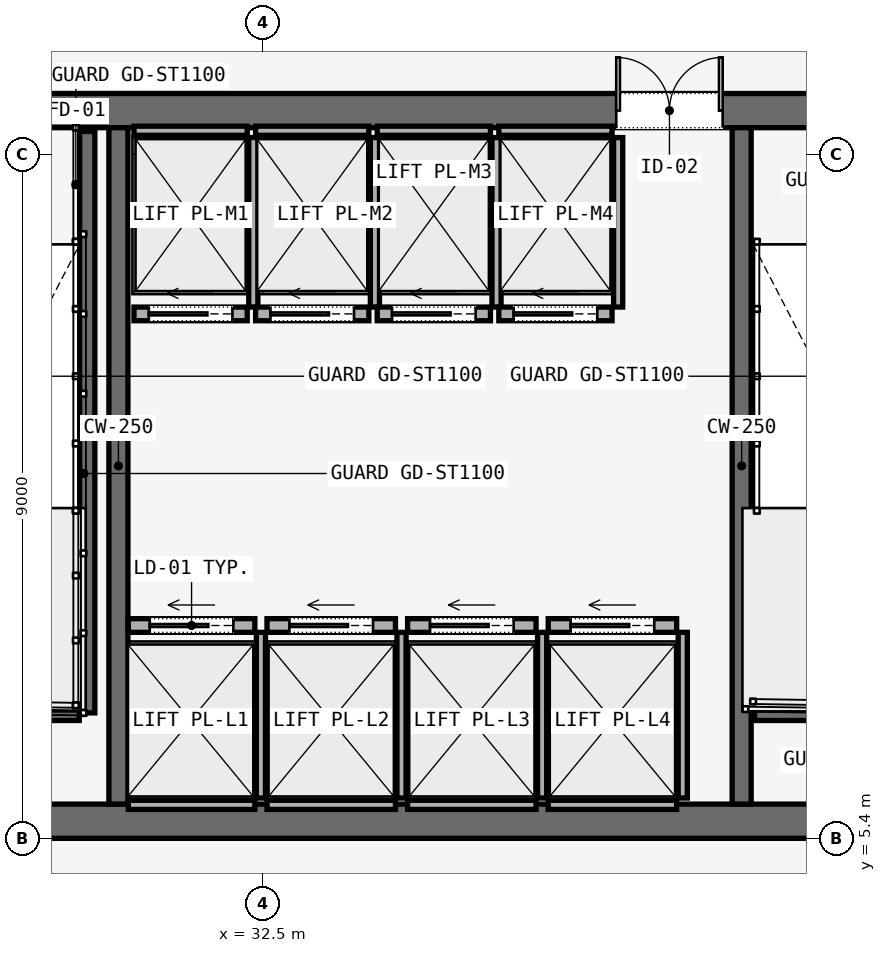
"""IFC4 building model, lengths in metres.
Left out: names, types, materials, properties, quantities, classifications, styles, units other than length and angle.
Written with IfcOpenShell. Run it as: python <this file> out.ifc"""

import sys

from ifc_helpers import new_model, si_unit, direction, frame, frame_2d, origin, place, context, subcontext, project, spatial, rectangle, extrude, element, fill, save


model = new_model("IFC4")
c1 = context("Model", 3, precision=1e-05, world=origin(), true_north=direction((0.0, 1.0)))
c2 = subcontext(c1, "Body", "Model", "MODEL_VIEW")
j1 = project(units=[si_unit("LENGTHUNIT", "METRE"), si_unit("PLANEANGLEUNIT", "RADIAN")], contexts=[c1])
p1 = place(None, origin())
s1 = spatial("IfcSite", under=j1, at=p1, CompositionType="ELEMENT")
p2 = place(p1, origin())
s2 = spatial("IfcBuilding", under=s1, at=p2, CompositionType="ELEMENT")
p3 = place(p2, frame((0.0, 0.0, 117.4)))
s3 = spatial("IfcBuildingStorey", under=s2, at=p3, CompositionType="ELEMENT", Elevation=117.4)
p4 = place(p3, frame((26.45, 14.975, 0.0), z_axis=(0.0, 0.0, 1.0), x_axis=(1.0, 0.0, 0.0)))
e1 = element("IfcWall", 1, at=p4, inside=s3, PredefinedType="SOLIDWALL", context=c2, shape_type="SweptSolid", body=[
    extrude(rectangle(XDim=31.1, YDim=0.45, at=frame_2d((15.55, 0.0))), origin(), (0.0, 0.0, 1.0), 4.52),
])
p5 = place(p4, frame((1.65, 0.0, 0.0)))
e2 = element("IfcOpeningElement", 2, at=p5, cuts=e1, PredefinedType="OPENING", context=c2, shape_type="SweptSolid", body=[
    extrude(rectangle(XDim=1.1, YDim=2.2, at=frame_2d((0.55, 1.1))), frame((0.0, 0.225, 0.0), z_axis=(0.0, -1.0, 0.0), x_axis=(1.0, 0.0, 0.0)), (0.0, 0.0, 1.0), 0.45),
])
p6 = place(p4, frame((13.65, 0.0, 0.0)))
e3 = element("IfcOpeningElement", 3, at=p6, cuts=e1, PredefinedType="OPENING", context=c2, shape_type="SweptSolid", body=[
    extrude(rectangle(XDim=1.1, YDim=2.2, at=frame_2d((0.55, 1.1))), frame((0.0, 0.225, 0.0), z_axis=(0.0, -1.0, 0.0), x_axis=(1.0, 0.0, 0.0)), (0.0, 0.0, 1.0), 0.45),
])
p7 = place(p4, frame((25.55, 0.0, 0.0)))
e4 = element("IfcOpeningElement", 4, at=p7, cuts=e1, PredefinedType="OPENING", context=c2, shape_type="SweptSolid", body=[
    extrude(rectangle(XDim=1.1, YDim=2.2, at=frame_2d((0.55, 1.1))), frame((0.0, 0.225, 0.0), z_axis=(0.0, -1.0, 0.0), x_axis=(1.0, 0.0, 0.0)), (0.0, 0.0, 1.0), 0.45),
])
p8 = place(p4, frame((10.7, 0.0, 0.0)))
e5 = element("IfcOpeningElement", 5, at=p8, cuts=e1, PredefinedType="OPENING", context=c2, shape_type="SweptSolid", body=[
    extrude(rectangle(XDim=1.4, YDim=2.2, at=frame_2d((0.7, 1.1))), frame((0.0, 0.225, 0.0), z_axis=(0.0, -1.0, 0.0), x_axis=(1.0, 0.0, 0.0)), (0.0, 0.0, 1.0), 0.45),
])
p9 = place(p4, frame((19.35, 0.0, 0.0)))
e6 = element("IfcOpeningElement", 6, at=p9, cuts=e1, PredefinedType="OPENING", context=c2, shape_type="SweptSolid", body=[
    extrude(rectangle(XDim=1.1, YDim=2.2, at=frame_2d((0.55, 1.1))), frame((0.0, 0.225, 0.0), z_axis=(0.0, -1.0, 0.0), x_axis=(1.0, 0.0, 0.0)), (0.0, 0.0, 1.0), 0.45),
])
p10 = place(p4, frame((21.4, 0.0, 0.0)))
e7 = element("IfcOpeningElement", 7, at=p10, cuts=e1, PredefinedType="OPENING", context=c2, shape_type="SweptSolid", body=[
    extrude(rectangle(XDim=0.9, YDim=2.1, at=frame_2d((0.45, 1.05))), frame((0.0, 0.225, 0.0), z_axis=(0.0, -1.0, 0.0), x_axis=(1.0, 0.0, 0.0)), (0.0, 0.0, 1.0), 0.45),
])
p11 = place(p4, frame((23.35, 0.0, 0.0)))
e8 = element("IfcOpeningElement", 8, at=p11, cuts=e1, PredefinedType="OPENING", context=c2, shape_type="SweptSolid", body=[
    extrude(rectangle(XDim=1.3, YDim=2.3, at=frame_2d((0.65, 1.15))), frame((0.0, 0.225, 0.0), z_axis=(0.0, -1.0, 0.0), x_axis=(1.0, 0.0, 0.0)), (0.0, 0.0, 1.0), 0.45),
])
p12 = place(p3, frame((26.45, 5.625, 0.0), z_axis=(0.0, 0.0, 1.0), x_axis=(1.0, 0.0, 0.0)))
e9 = element("IfcWall", 9, at=p12, inside=s3, PredefinedType="SOLIDWALL", context=c2, shape_type="SweptSolid", body=[
    extrude(rectangle(XDim=31.1, YDim=0.45, at=frame_2d((15.55, 0.0))), origin(), (0.0, 0.0, 1.0), 4.52),
])
for number, where, z_axis, x_axis in (
    (10, (30.6, 5.85, 0.0), (0.0, 0.0, 1.0), (0.0, 1.0, 0.0)),
    (11, (38.8, 5.85, 0.0), (0.0, 0.0, 1.0), (0.0, 1.0, 0.0)),
):
    element("IfcWall", number, at=place(p3, frame(where, z_axis=z_axis, x_axis=x_axis)), inside=s3, PredefinedType="SOLIDWALL", context=c2, shape_type="SweptSolid", body=[
        extrude(rectangle(XDim=8.9, YDim=0.25, at=frame_2d((4.45, 0.0))), origin(), (0.0, 0.0, 1.0), 4.52),
    ])
p13 = place(p3, frame((30.19, 14.7, 0.0), z_axis=(0.0, 0.0, 1.0), x_axis=(0.0, -1.0, 0.0)))
e12 = element("IfcWall", 12, at=p13, inside=s3, PredefinedType="SOLIDWALL", context=c2, shape_type="SweptSolid", body=[
    extrude(rectangle(XDim=7.65, YDim=0.2, at=frame_2d((3.825, 0.0))), origin(), (0.0, 0.0, 1.0), 4.8),
])
for number, where, z_axis, x_axis in (
    (13, (26.97, 7.05, 0.0), (0.0, 0.0, 1.0), (1.0, 0.0, 0.0)),
    (14, (38.97, 7.05, 0.0), (0.0, 0.0, 1.0), (1.0, 0.0, 0.0)),
):
    element("IfcWall", number, at=place(p3, frame(where, z_axis=z_axis, x_axis=x_axis)), inside=s3, PredefinedType="SOLIDWALL", context=c2, shape_type="SweptSolid", body=[
        extrude(rectangle(XDim=3.115, YDim=0.2, at=frame_2d((1.558, 0.0))), origin(), (0.0, 0.0, 1.0), 4.8),
    ])
p14 = place(p3, frame((30.73, 8.2, 0.0), z_axis=(0.0, 0.0, 1.0), x_axis=(1.0, 0.0, 0.0)))
e15 = element("IfcWall", 15, at=p14, inside=s3, PredefinedType="SOLIDWALL", context=c2, shape_type="SweptSolid", body=[
    extrude(rectangle(XDim=1.665, YDim=0.18, at=frame_2d((0.833, 0.0))), origin(), (0.0, 0.0, 1.0), 3.39),
])
p15 = place(p14, frame((0.282, 0.0, 0.0)))
e16 = element("IfcOpeningElement", 16, at=p15, cuts=e15, PredefinedType="OPENING", context=c2, shape_type="SweptSolid", body=[
    extrude(rectangle(XDim=1.1, YDim=2.2, at=frame_2d((0.55, 1.1))), frame((0.0, 0.09, 0.0), z_axis=(0.0, -1.0, 0.0), x_axis=(1.0, 0.0, 0.0)), (0.0, 0.0, 1.0), 0.18),
])
p16 = place(p3, frame((30.73, 5.84, 0.0), z_axis=(0.0, 0.0, 1.0), x_axis=(1.0, 0.0, 0.0)))
e17 = element("IfcWall", 17, at=p16, inside=s3, PredefinedType="SOLIDWALL", context=c2, shape_type="SweptSolid", body=[
    extrude(rectangle(XDim=1.665, YDim=0.12, at=frame_2d((0.833, 0.0))), origin(), (0.0, 0.0, 1.0), 3.39),
])
p17 = place(p3, frame((32.475, 5.93, 0.0), z_axis=(0.0, 0.0, 1.0), x_axis=(0.0, 1.0, 0.0)))
e18 = element("IfcWall", 18, at=p17, inside=s3, PredefinedType="SOLIDWALL", context=c2, shape_type="SweptSolid", body=[
    extrude(rectangle(XDim=2.18, YDim=0.12, at=frame_2d((1.09, 0.0))), origin(), (0.0, 0.0, 1.0), 3.39),
])
p18 = place(p3, frame((32.555, 8.2, 0.0), z_axis=(0.0, 0.0, 1.0), x_axis=(1.0, 0.0, 0.0)))
e19 = element("IfcWall", 19, at=p18, inside=s3, PredefinedType="SOLIDWALL", context=c2, shape_type="SweptSolid", body=[
    extrude(rectangle(XDim=1.69, YDim=0.18, at=frame_2d((0.845, 0.0))), origin(), (0.0, 0.0, 1.0), 3.39),
])
p19 = place(p18, frame((0.295, 0.0, 0.0)))
e20 = element("IfcOpeningElement", 20, at=p19, cuts=e19, PredefinedType="OPENING", context=c2, shape_type="SweptSolid", body=[
    extrude(rectangle(XDim=1.1, YDim=2.2, at=frame_2d((0.55, 1.1))), frame((0.0, 0.09, 0.0), z_axis=(0.0, -1.0, 0.0), x_axis=(1.0, 0.0, 0.0)), (0.0, 0.0, 1.0), 0.18),
])
p20 = place(p3, frame((32.555, 5.84, 0.0), z_axis=(0.0, 0.0, 1.0), x_axis=(1.0, 0.0, 0.0)))
e21 = element("IfcWall", 21, at=p20, inside=s3, PredefinedType="SOLIDWALL", context=c2, shape_type="SweptSolid", body=[
    extrude(rectangle(XDim=1.69, YDim=0.12, at=frame_2d((0.845, 0.0))), origin(), (0.0, 0.0, 1.0), 3.39),
])
p21 = place(p3, frame((34.325, 5.93, 0.0), z_axis=(0.0, 0.0, 1.0), x_axis=(0.0, 1.0, 0.0)))
e22 = element("IfcWall", 22, at=p21, inside=s3, PredefinedType="SOLIDWALL", context=c2, shape_type="SweptSolid", body=[
    extrude(rectangle(XDim=2.18, YDim=0.12, at=frame_2d((1.09, 0.0))), origin(), (0.0, 0.0, 1.0), 3.39),
])
p22 = place(p3, frame((34.405, 8.2, 0.0), z_axis=(0.0, 0.0, 1.0), x_axis=(1.0, 0.0, 0.0)))
e23 = element("IfcWall", 23, at=p22, inside=s3, PredefinedType="SOLIDWALL", context=c2, shape_type="SweptSolid", body=[
    extrude(rectangle(XDim=1.69, YDim=0.18, at=frame_2d((0.845, 0.0))), origin(), (0.0, 0.0, 1.0), 3.39),
])
p23 = place(p22, frame((0.295, 0.0, 0.0)))
e24 = element("IfcOpeningElement", 24, at=p23, cuts=e23, PredefinedType="OPENING", context=c2, shape_type="SweptSolid", body=[
    extrude(rectangle(XDim=1.1, YDim=2.2, at=frame_2d((0.55, 1.1))), frame((0.0, 0.09, 0.0), z_axis=(0.0, -1.0, 0.0), x_axis=(1.0, 0.0, 0.0)), (0.0, 0.0, 1.0), 0.18),
])
p24 = place(p3, frame((34.405, 5.84, 0.0), z_axis=(0.0, 0.0, 1.0), x_axis=(1.0, 0.0, 0.0)))
e25 = element("IfcWall", 25, at=p24, inside=s3, PredefinedType="SOLIDWALL", context=c2, shape_type="SweptSolid", body=[
    extrude(rectangle(XDim=1.69, YDim=0.12, at=frame_2d((0.845, 0.0))), origin(), (0.0, 0.0, 1.0), 3.39),
])
p25 = place(p3, frame((36.175, 5.93, 0.0), z_axis=(0.0, 0.0, 1.0), x_axis=(0.0, 1.0, 0.0)))
e26 = element("IfcWall", 26, at=p25, inside=s3, PredefinedType="SOLIDWALL", context=c2, shape_type="SweptSolid", body=[
    extrude(rectangle(XDim=2.18, YDim=0.12, at=frame_2d((1.09, 0.0))), origin(), (0.0, 0.0, 1.0), 3.39),
])
p26 = place(p3, frame((36.255, 8.2, 0.0), z_axis=(0.0, 0.0, 1.0), x_axis=(1.0, 0.0, 0.0)))
e27 = element("IfcWall", 27, at=p26, inside=s3, PredefinedType="SOLIDWALL", context=c2, shape_type="SweptSolid", body=[
    extrude(rectangle(XDim=1.69, YDim=0.18, at=frame_2d((0.845, 0.0))), origin(), (0.0, 0.0, 1.0), 3.39),
])
p27 = place(p26, frame((0.295, 0.0, 0.0)))
e28 = element("IfcOpeningElement", 28, at=p27, cuts=e27, PredefinedType="OPENING", context=c2, shape_type="SweptSolid", body=[
    extrude(rectangle(XDim=1.1, YDim=2.2, at=frame_2d((0.55, 1.1))), frame((0.0, 0.09, 0.0), z_axis=(0.0, -1.0, 0.0), x_axis=(1.0, 0.0, 0.0)), (0.0, 0.0, 1.0), 0.18),
])
p28 = place(p3, frame((36.255, 5.84, 0.0), z_axis=(0.0, 0.0, 1.0), x_axis=(1.0, 0.0, 0.0)))
e29 = element("IfcWall", 29, at=p28, inside=s3, PredefinedType="SOLIDWALL", context=c2, shape_type="SweptSolid", body=[
    extrude(rectangle(XDim=1.69, YDim=0.12, at=frame_2d((0.845, 0.0))), origin(), (0.0, 0.0, 1.0), 3.39),
])
p29 = place(p3, frame((38.025, 5.93, 0.0), z_axis=(0.0, 0.0, 1.0), x_axis=(0.0, 1.0, 0.0)))
e30 = element("IfcWall", 30, at=p29, inside=s3, PredefinedType="SOLIDWALL", context=c2, shape_type="SweptSolid", body=[
    extrude(rectangle(XDim=2.18, YDim=0.12, at=frame_2d((1.09, 0.0))), origin(), (0.0, 0.0, 1.0), 3.39),
])
p30 = place(p3, frame((30.805, 12.3, 0.0), z_axis=(0.0, 0.0, 1.0), x_axis=(1.0, 0.0, 0.0)))
e31 = element("IfcWall", 31, at=p30, inside=s3, PredefinedType="SOLIDWALL", context=c2, shape_type="SweptSolid", body=[
    extrude(rectangle(XDim=1.49, YDim=0.18, at=frame_2d((0.745, 0.0))), origin(), (0.0, 0.0, 1.0), 3.39),
])
p31 = place(p30, frame((0.195, 0.0, 0.0)))
e32 = element("IfcOpeningElement", 32, at=p31, cuts=e31, PredefinedType="OPENING", context=c2, shape_type="SweptSolid", body=[
    extrude(rectangle(XDim=1.1, YDim=2.2, at=frame_2d((0.55, 1.1))), frame((0.0, 0.09, 0.0), z_axis=(0.0, -1.0, 0.0), x_axis=(1.0, 0.0, 0.0)), (0.0, 0.0, 1.0), 0.18),
])
p32 = place(p3, frame((30.805, 14.71, 0.0), z_axis=(0.0, 0.0, 1.0), x_axis=(1.0, 0.0, 0.0)))
e33 = element("IfcWall", 33, at=p32, inside=s3, PredefinedType="SOLIDWALL", context=c2, shape_type="SweptSolid", body=[
    extrude(rectangle(XDim=1.49, YDim=0.12, at=frame_2d((0.745, 0.0))), origin(), (0.0, 0.0, 1.0), 3.39),
])
p33 = place(p3, frame((32.375, 12.39, 0.0), z_axis=(0.0, 0.0, 1.0), x_axis=(0.0, 1.0, 0.0)))
e34 = element("IfcWall", 34, at=p33, inside=s3, PredefinedType="SOLIDWALL", context=c2, shape_type="SweptSolid", body=[
    extrude(rectangle(XDim=2.23, YDim=0.12, at=frame_2d((1.115, 0.0))), origin(), (0.0, 0.0, 1.0), 3.39),
])
p34 = place(p3, frame((32.405, 12.3, 0.0), z_axis=(0.0, 0.0, 1.0), x_axis=(1.0, 0.0, 0.0)))
e35 = element("IfcWall", 35, at=p34, inside=s3, PredefinedType="SOLIDWALL", context=c2, shape_type="SweptSolid", body=[
    extrude(rectangle(XDim=1.49, YDim=0.18, at=frame_2d((0.745, 0.0))), origin(), (0.0, 0.0, 1.0), 3.39),
])
p35 = place(p34, frame((0.195, 0.0, 0.0)))
e36 = element("IfcOpeningElement", 36, at=p35, cuts=e35, PredefinedType="OPENING", context=c2, shape_type="SweptSolid", body=[
    extrude(rectangle(XDim=1.1, YDim=2.2, at=frame_2d((0.55, 1.1))), frame((0.0, 0.09, 0.0), z_axis=(0.0, -1.0, 0.0), x_axis=(1.0, 0.0, 0.0)), (0.0, 0.0, 1.0), 0.18),
])
p36 = place(p3, frame((32.405, 14.71, 0.0), z_axis=(0.0, 0.0, 1.0), x_axis=(1.0, 0.0, 0.0)))
e37 = element("IfcWall", 37, at=p36, inside=s3, PredefinedType="SOLIDWALL", context=c2, shape_type="SweptSolid", body=[
    extrude(rectangle(XDim=1.49, YDim=0.12, at=frame_2d((0.745, 0.0))), origin(), (0.0, 0.0, 1.0), 3.39),
])
p37 = place(p3, frame((33.975, 12.39, 0.0), z_axis=(0.0, 0.0, 1.0), x_axis=(0.0, 1.0, 0.0)))
e38 = element("IfcWall", 38, at=p37, inside=s3, PredefinedType="SOLIDWALL", context=c2, shape_type="SweptSolid", body=[
    extrude(rectangle(XDim=2.23, YDim=0.12, at=frame_2d((1.115, 0.0))), origin(), (0.0, 0.0, 1.0), 3.39),
])
p38 = place(p3, frame((34.005, 12.3, 0.0), z_axis=(0.0, 0.0, 1.0), x_axis=(1.0, 0.0, 0.0)))
e39 = element("IfcWall", 39, at=p38, inside=s3, PredefinedType="SOLIDWALL", context=c2, shape_type="SweptSolid", body=[
    extrude(rectangle(XDim=1.49, YDim=0.18, at=frame_2d((0.745, 0.0))), origin(), (0.0, 0.0, 1.0), 3.39),
])
p39 = place(p38, frame((0.195, 0.0, 0.0)))
e40 = element("IfcOpeningElement", 40, at=p39, cuts=e39, PredefinedType="OPENING", context=c2, shape_type="SweptSolid", body=[
    extrude(rectangle(XDim=1.1, YDim=2.2, at=frame_2d((0.55, 1.1))), frame((0.0, 0.09, 0.0), z_axis=(0.0, -1.0, 0.0), x_axis=(1.0, 0.0, 0.0)), (0.0, 0.0, 1.0), 0.18),
])
p40 = place(p3, frame((34.005, 14.71, 0.0), z_axis=(0.0, 0.0, 1.0), x_axis=(1.0, 0.0, 0.0)))
e41 = element("IfcWall", 41, at=p40, inside=s3, PredefinedType="SOLIDWALL", context=c2, shape_type="SweptSolid", body=[
    extrude(rectangle(XDim=1.49, YDim=0.12, at=frame_2d((0.745, 0.0))), origin(), (0.0, 0.0, 1.0), 3.39),
])
p41 = place(p3, frame((35.575, 12.39, 0.0), z_axis=(0.0, 0.0, 1.0), x_axis=(0.0, 1.0, 0.0)))
e42 = element("IfcWall", 42, at=p41, inside=s3, PredefinedType="SOLIDWALL", context=c2, shape_type="SweptSolid", body=[
    extrude(rectangle(XDim=2.23, YDim=0.12, at=frame_2d((1.115, 0.0))), origin(), (0.0, 0.0, 1.0), 3.39),
])
p42 = place(p3, frame((35.605, 12.3, 0.0), z_axis=(0.0, 0.0, 1.0), x_axis=(1.0, 0.0, 0.0)))
e43 = element("IfcWall", 43, at=p42, inside=s3, PredefinedType="SOLIDWALL", context=c2, shape_type="SweptSolid", body=[
    extrude(rectangle(XDim=1.49, YDim=0.18, at=frame_2d((0.745, 0.0))), origin(), (0.0, 0.0, 1.0), 3.39),
])
p43 = place(p42, frame((0.195, 0.0, 0.0)))
e44 = element("IfcOpeningElement", 44, at=p43, cuts=e43, PredefinedType="OPENING", context=c2, shape_type="SweptSolid", body=[
    extrude(rectangle(XDim=1.1, YDim=2.2, at=frame_2d((0.55, 1.1))), frame((0.0, 0.09, 0.0), z_axis=(0.0, -1.0, 0.0), x_axis=(1.0, 0.0, 0.0)), (0.0, 0.0, 1.0), 0.18),
])
p44 = place(p3, frame((35.605, 14.71, 0.0), z_axis=(0.0, 0.0, 1.0), x_axis=(1.0, 0.0, 0.0)))
e45 = element("IfcWall", 45, at=p44, inside=s3, PredefinedType="SOLIDWALL", context=c2, shape_type="SweptSolid", body=[
    extrude(rectangle(XDim=1.49, YDim=0.12, at=frame_2d((0.745, 0.0))), origin(), (0.0, 0.0, 1.0), 3.39),
])
p45 = place(p3, frame((37.175, 12.39, 0.0), z_axis=(0.0, 0.0, 1.0), x_axis=(0.0, 1.0, 0.0)))
e46 = element("IfcWall", 46, at=p45, inside=s3, PredefinedType="SOLIDWALL", context=c2, shape_type="SweptSolid", body=[
    extrude(rectangle(XDim=2.23, YDim=0.12, at=frame_2d((1.115, 0.0))), origin(), (0.0, 0.0, 1.0), 3.39),
])
p46 = place(p8, origin())
e47 = element("IfcDoor", 47, at=p46, inside=s3, OperationType="DOUBLE_DOOR_SINGLE_SWING", PredefinedType="DOOR", context=c2, shape_type="SweptSolid", body=[
    extrude(rectangle(XDim=1.4, YDim=2.2, at=frame_2d((0.7, 1.1))), frame((0.0, 0.025, 0.0), z_axis=(0.0, -1.0, 0.0), x_axis=(1.0, 0.0, 0.0)), (0.0, 0.0, 1.0), 0.05),
])
fill(e5, e47)
p47 = place(p15, origin())
e48 = element("IfcDoor", 48, at=p47, inside=s3, OperationType="SLIDING_TO_LEFT", PredefinedType="DOOR", context=c2, shape_type="SweptSolid", body=[
    extrude(rectangle(XDim=1.1, YDim=2.2, at=frame_2d((0.55, 1.1))), frame((0.0, 0.025, 0.0), z_axis=(0.0, -1.0, 0.0), x_axis=(1.0, 0.0, 0.0)), (0.0, 0.0, 1.0), 0.05),
])
fill(e16, e48)
p48 = place(p19, origin())
e49 = element("IfcDoor", 49, at=p48, inside=s3, OperationType="SLIDING_TO_LEFT", PredefinedType="DOOR", context=c2, shape_type="SweptSolid", body=[
    extrude(rectangle(XDim=1.1, YDim=2.2, at=frame_2d((0.55, 1.1))), frame((0.0, 0.025, 0.0), z_axis=(0.0, -1.0, 0.0), x_axis=(1.0, 0.0, 0.0)), (0.0, 0.0, 1.0), 0.05),
])
fill(e20, e49)
p49 = place(p23, origin())
e50 = element("IfcDoor", 50, at=p49, inside=s3, OperationType="SLIDING_TO_LEFT", PredefinedType="DOOR", context=c2, shape_type="SweptSolid", body=[
    extrude(rectangle(XDim=1.1, YDim=2.2, at=frame_2d((0.55, 1.1))), frame((0.0, 0.025, 0.0), z_axis=(0.0, -1.0, 0.0), x_axis=(1.0, 0.0, 0.0)), (0.0, 0.0, 1.0), 0.05),
])
fill(e24, e50)
p50 = place(p27, origin())
e51 = element("IfcDoor", 51, at=p50, inside=s3, OperationType="SLIDING_TO_LEFT", PredefinedType="DOOR", context=c2, shape_type="SweptSolid", body=[
    extrude(rectangle(XDim=1.1, YDim=2.2, at=frame_2d((0.55, 1.1))), frame((0.0, 0.025, 0.0), z_axis=(0.0, -1.0, 0.0), x_axis=(1.0, 0.0, 0.0)), (0.0, 0.0, 1.0), 0.05),
])
fill(e28, e51)
p51 = place(p31, origin())
e52 = element("IfcDoor", 52, at=p51, inside=s3, OperationType="SLIDING_TO_LEFT", PredefinedType="DOOR", context=c2, shape_type="SweptSolid", body=[
    extrude(rectangle(XDim=1.1, YDim=2.2, at=frame_2d((0.55, 1.1))), frame((0.0, 0.025, 0.0), z_axis=(0.0, -1.0, 0.0), x_axis=(1.0, 0.0, 0.0)), (0.0, 0.0, 1.0), 0.05),
])
fill(e32, e52)
p52 = place(p35, origin())
e53 = element("IfcDoor", 53, at=p52, inside=s3, OperationType="SLIDING_TO_LEFT", PredefinedType="DOOR", context=c2, shape_type="SweptSolid", body=[
    extrude(rectangle(XDim=1.1, YDim=2.2, at=frame_2d((0.55, 1.1))), frame((0.0, 0.025, 0.0), z_axis=(0.0, -1.0, 0.0), x_axis=(1.0, 0.0, 0.0)), (0.0, 0.0, 1.0), 0.05),
])
fill(e36, e53)
p53 = place(p39, origin())
e54 = element("IfcDoor", 54, at=p53, inside=s3, OperationType="SLIDING_TO_LEFT", PredefinedType="DOOR", context=c2, shape_type="SweptSolid", body=[
    extrude(rectangle(XDim=1.1, YDim=2.2, at=frame_2d((0.55, 1.1))), frame((0.0, 0.025, 0.0), z_axis=(0.0, -1.0, 0.0), x_axis=(1.0, 0.0, 0.0)), (0.0, 0.0, 1.0), 0.05),
])
fill(e40, e54)
p54 = place(p43, origin())
e55 = element("IfcDoor", 55, at=p54, inside=s3, OperationType="SLIDING_TO_LEFT", PredefinedType="DOOR", context=c2, shape_type="SweptSolid", body=[
    extrude(rectangle(XDim=1.1, YDim=2.2, at=frame_2d((0.55, 1.1))), frame((0.0, 0.025, 0.0), z_axis=(0.0, -1.0, 0.0), x_axis=(1.0, 0.0, 0.0)), (0.0, 0.0, 1.0), 0.05),
])
fill(e44, e55)
save(model, sys.argv[1])
